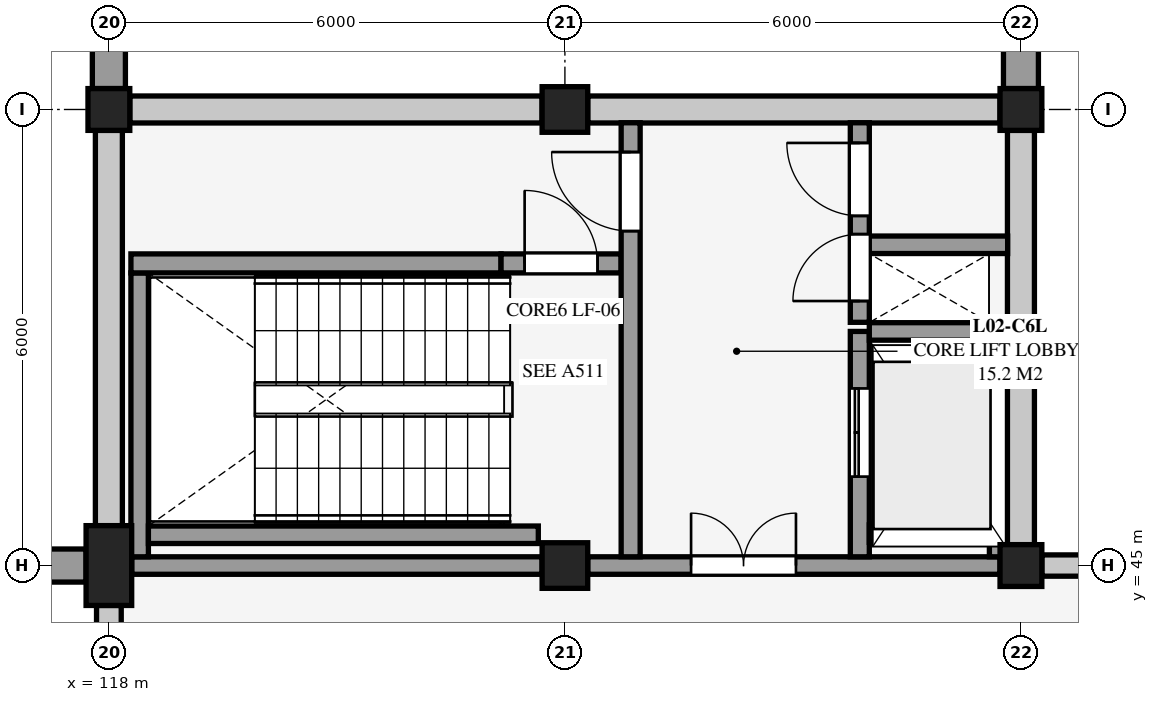
"""IFC4 building model, lengths in metres.
Left out: names, types, materials, properties, quantities, classifications, styles, units other than length and angle.
Written with IfcOpenShell. Run it as: python <this file> out.ifc"""

import sys

from ifc_helpers import new_model, si_unit, direction, frame, frame_2d, origin, origin_2d, place, context, subcontext, project, spatial, rectangle, extrude, element, fill, save


model = new_model("IFC4")
c1 = context("Model", 3, precision=1e-05, world=origin(), true_north=direction((0.0, 1.0)))
c2 = subcontext(c1, "Body", "Model", "MODEL_VIEW")
j1 = project(units=[si_unit("LENGTHUNIT", "METRE"), si_unit("PLANEANGLEUNIT", "RADIAN")], contexts=[c1])
p1 = place(None, origin())
s1 = spatial("IfcSite", under=j1, at=p1, CompositionType="ELEMENT")
p2 = place(p1, origin())
s2 = spatial("IfcBuilding", under=s1, at=p2, CompositionType="ELEMENT")
p3 = place(p2, frame((0.0, 0.0, 4.5)))
s3 = spatial("IfcBuildingStorey", under=s2, at=p3, CompositionType="ELEMENT", Elevation=4.5)
p4 = place(p3, frame((118.0, 45.0, 0.0), z_axis=(0.0, 0.0, 1.0), x_axis=(1.0, 0.0, 0.0)))
e1 = element("IfcColumn", 1, at=p4, inside=s3, PredefinedType="PILASTER", context=c2, shape_type="SweptSolid", body=[
    extrude(rectangle(XDim=0.6, YDim=1.05, at=origin_2d()), origin(), (0.0, 0.0, 1.0), 4.5),
])
p5 = place(p3, frame((118.0, 51.0, 0.0), z_axis=(0.0, 0.0, 1.0), x_axis=(1.0, 0.0, 0.0)))
e2 = element("IfcColumn", 2, at=p5, inside=s3, PredefinedType="COLUMN", context=c2, shape_type="SweptSolid", body=[
    extrude(rectangle(XDim=0.55, YDim=0.55, at=origin_2d()), origin(), (0.0, 0.0, 1.0), 4.5),
])
for number, where, z_axis, x_axis in (
    (3, (124.0, 45.0, 0.0), (0.0, 0.0, 1.0), (1.0, 0.0, 0.0)),
    (4, (124.0, 51.0, 0.0), (0.0, 0.0, 1.0), (1.0, 0.0, 0.0)),
):
    element("IfcColumn", number, at=place(p3, frame(where, z_axis=z_axis, x_axis=x_axis)), inside=s3, PredefinedType="COLUMN", context=c2, shape_type="SweptSolid", body=[
        extrude(rectangle(XDim=0.6, YDim=0.6, at=origin_2d()), origin(), (0.0, 0.0, 1.0), 4.5),
    ])
for number, where, z_axis, x_axis in (
    (5, (130.0, 45.0, 0.0), (0.0, 0.0, 1.0), (1.0, 0.0, 0.0)),
    (6, (130.0, 51.0, 0.0), (0.0, 0.0, 1.0), (1.0, 0.0, 0.0)),
):
    element("IfcColumn", number, at=place(p3, frame(where, z_axis=z_axis, x_axis=x_axis)), inside=s3, PredefinedType="COLUMN", context=c2, shape_type="SweptSolid", body=[
        extrude(rectangle(XDim=0.55, YDim=0.55, at=origin_2d()), origin(), (0.0, 0.0, 1.0), 4.5),
    ])
p6 = place(p3, frame((112.3, 45.0, 0.0), z_axis=(0.0, 0.0, 1.0), x_axis=(1.0, 0.0, 0.0)))
e7 = element("IfcWall", 7, at=p6, inside=s3, PredefinedType="USERDEFINED", context=c2, shape_type="SweptSolid", body=[
    extrude(rectangle(XDim=5.4, YDim=0.435, at=frame_2d((2.7, 0.0))), origin(), (0.0, 0.0, 1.0), 4.5),
])
p7 = place(p3, frame((118.0, 51.275, 0.0), z_axis=(0.0, 0.0, 1.0), x_axis=(0.0, 1.0, 0.0)))
e8 = element("IfcWall", 8, at=p7, inside=s3, PredefinedType="USERDEFINED", context=c2, shape_type="SweptSolid", body=[
    extrude(rectangle(XDim=4.7, YDim=0.435, at=frame_2d((2.35, 0.0))), origin(), (0.0, 0.0, 1.0), 4.5),
])
p8 = place(p3, frame((130.0, 51.275, 0.0), z_axis=(0.0, 0.0, 1.0), x_axis=(0.0, 1.0, 0.0)))
e9 = element("IfcWall", 9, at=p8, inside=s3, PredefinedType="USERDEFINED", context=c2, shape_type="SweptSolid", body=[
    extrude(rectangle(XDim=4.95, YDim=0.46, at=frame_2d((2.475, 0.0))), origin(), (0.0, 0.0, 1.0), 4.5),
])
p9 = place(p3, frame((130.275, 45.0, 0.0), z_axis=(0.0, 0.0, 1.0), x_axis=(1.0, 0.0, 0.0)))
e10 = element("IfcWall", 10, at=p9, inside=s3, PredefinedType="SOLIDWALL", context=c2, shape_type="SweptSolid", body=[
    extrude(rectangle(XDim=5.45, YDim=0.28, at=frame_2d((2.725, 0.0))), origin(), (0.0, 0.0, 1.0), 3.796),
])
p10 = place(p9, frame((1.85, 0.0, 0.75)))
e11 = element("IfcOpeningElement", 11, at=p10, cuts=e10, PredefinedType="OPENING", context=c2, shape_type="SweptSolid", body=[
    extrude(rectangle(XDim=1.75, YDim=2.3, at=frame_2d((0.875, 1.15))), frame((0.0, 0.15, 0.0), z_axis=(0.0, -1.0, 0.0), x_axis=(1.0, 0.0, 0.0)), (0.0, 0.0, 1.0), 0.3),
])
p11 = place(p3, frame((118.0, 39.3, 0.0), z_axis=(0.0, 0.0, 1.0), x_axis=(0.0, 1.0, 0.0)))
e12 = element("IfcWall", 12, at=p11, inside=s3, PredefinedType="SOLIDWALL", context=c2, shape_type="SweptSolid", body=[
    extrude(rectangle(XDim=5.175, YDim=0.325, at=frame_2d((2.587, 0.0))), origin(), (0.0, 0.0, 1.0), 3.778),
])
p12 = place(p11, frame((1.562, 0.0, 0.7)))
e13 = element("IfcOpeningElement", 13, at=p12, cuts=e12, PredefinedType="OPENING", context=c2, shape_type="SweptSolid", body=[
    extrude(rectangle(XDim=2.05, YDim=2.4, at=frame_2d((1.025, 1.2))), frame((0.0, 0.173, 0.0), z_axis=(0.0, -1.0, 0.0), x_axis=(1.0, 0.0, 0.0)), (0.0, 0.0, 1.0), 0.345),
])
p13 = place(p3, frame((118.275, 51.0, 0.0), z_axis=(0.0, 0.0, 1.0), x_axis=(1.0, 0.0, 0.0)))
e14 = element("IfcWall", 14, at=p13, inside=s3, PredefinedType="SOLIDWALL", context=c2, shape_type="SweptSolid", body=[
    extrude(rectangle(XDim=5.425, YDim=0.355, at=frame_2d((2.712, 0.0))), origin(), (0.0, 0.0, 1.0), 3.783),
])
p14 = place(p3, frame((124.3, 51.0, 0.0), z_axis=(0.0, 0.0, 1.0), x_axis=(1.0, 0.0, 0.0)))
e15 = element("IfcWall", 15, at=p14, inside=s3, PredefinedType="SOLIDWALL", context=c2, shape_type="SweptSolid", body=[
    extrude(rectangle(XDim=5.425, YDim=0.355, at=frame_2d((2.712, 0.0))), origin(), (0.0, 0.0, 1.0), 3.743),
])
p15 = place(p3, frame((118.0, 45.525, 0.0), z_axis=(0.0, 0.0, 1.0), x_axis=(0.0, 1.0, 0.0)))
e16 = element("IfcWall", 16, at=p15, inside=s3, PredefinedType="SOLIDWALL", context=c2, shape_type="SweptSolid", body=[
    extrude(rectangle(XDim=5.2, YDim=0.355, at=frame_2d((2.6, 0.0))), origin(), (0.0, 0.0, 1.0), 3.577),
])
p16 = place(p3, frame((130.0, 50.725, 0.0), z_axis=(0.0, 0.0, 1.0), x_axis=(0.0, -1.0, 0.0)))
e17 = element("IfcWall", 17, at=p16, inside=s3, PredefinedType="SOLIDWALL", context=c2, shape_type="SweptSolid", body=[
    extrude(rectangle(XDim=5.45, YDim=0.355, at=frame_2d((2.725, 0.0))), origin(), (0.0, 0.0, 1.0), 3.693),
])
p17 = place(p3, frame((118.3, 45.0, 0.0), z_axis=(0.0, 0.0, 1.0), x_axis=(1.0, 0.0, 0.0)))
e18 = element("IfcWall", 18, at=p17, inside=s3, PredefinedType="SHEAR", context=c2, shape_type="SweptSolid", body=[
    extrude(rectangle(XDim=5.4, YDim=0.23, at=frame_2d((2.7, 0.0))), origin(), (0.0, 0.0, 1.0), 4.276),
])
p18 = place(p3, frame((124.3, 45.0, 0.0), z_axis=(0.0, 0.0, 1.0), x_axis=(1.0, 0.0, 0.0)))
e19 = element("IfcWall", 19, at=p18, inside=s3, PredefinedType="SHEAR", context=c2, shape_type="SweptSolid", body=[
    extrude(rectangle(XDim=5.425, YDim=0.23, at=frame_2d((2.712, 0.0))), origin(), (0.0, 0.0, 1.0), 4.276),
])
p19 = place(p18, frame((1.36, 0.0, 0.0)))
e20 = element("IfcOpeningElement", 20, at=p19, cuts=e19, PredefinedType="OPENING", context=c2, shape_type="SweptSolid", body=[
    extrude(rectangle(XDim=1.38, YDim=2.16, at=frame_2d((0.69, 1.08))), frame((0.0, 0.125, 0.0), z_axis=(0.0, -1.0, 0.0), x_axis=(1.0, 0.0, 0.0)), (0.0, 0.0, 1.0), 0.25),
])
p20 = place(p3, frame((118.405, 45.115, 0.0), z_axis=(0.0, 0.0, 1.0), x_axis=(0.0, 1.0, 0.0)))
e21 = element("IfcWall", 21, at=p20, inside=s3, PredefinedType="SHEAR", context=c2, shape_type="SweptSolid", body=[
    extrude(rectangle(XDim=3.735, YDim=0.23, at=frame_2d((1.868, 0.0))), origin(), (0.0, 0.0, 1.0), 4.5),
])
p21 = place(p3, frame((118.52, 45.405, 0.0), z_axis=(0.0, 0.0, 1.0), x_axis=(1.0, 0.0, 0.0)))
e22 = element("IfcWall", 22, at=p21, inside=s3, PredefinedType="SHEAR", context=c2, shape_type="SweptSolid", body=[
    extrude(rectangle(XDim=5.13, YDim=0.23, at=frame_2d((2.565, 0.0))), origin(), (0.0, 0.0, 1.0), 4.5),
])
p22 = place(p3, frame((118.29, 48.975, 0.0), z_axis=(0.0, 0.0, 1.0), x_axis=(1.0, 0.0, 0.0)))
e23 = element("IfcWall", 23, at=p22, inside=s3, PredefinedType="SHEAR", context=c2, shape_type="SweptSolid", body=[
    extrude(rectangle(XDim=4.87, YDim=0.25, at=frame_2d((2.435, 0.0))), origin(), (0.0, 0.0, 1.0), 4.5),
])
p23 = place(p3, frame((123.16, 48.975, 0.0), z_axis=(0.0, 0.0, 1.0), x_axis=(1.0, 0.0, 0.0)))
e24 = element("IfcWall", 24, at=p23, inside=s3, PredefinedType="SHEAR", context=c2, shape_type="SweptSolid", body=[
    extrude(rectangle(XDim=1.58, YDim=0.25, at=frame_2d((0.79, 0.0))), origin(), (0.0, 0.0, 1.0), 4.276),
])
p24 = place(p23, frame((0.31, 0.0, 0.0)))
e25 = element("IfcOpeningElement", 25, at=p24, cuts=e24, PredefinedType="OPENING", context=c2, shape_type="SweptSolid", body=[
    extrude(rectangle(XDim=0.96, YDim=2.12, at=frame_2d((0.48, 1.06))), frame((0.0, 0.135, 0.0), z_axis=(0.0, -1.0, 0.0), x_axis=(1.0, 0.0, 0.0)), (0.0, 0.0, 1.0), 0.27),
])
p25 = place(p3, frame((124.865, 45.115, 0.0), z_axis=(0.0, 0.0, 1.0), x_axis=(0.0, 1.0, 0.0)))
e26 = element("IfcWall", 26, at=p25, inside=s3, PredefinedType="SHEAR", context=c2, shape_type="SweptSolid", body=[
    extrude(rectangle(XDim=5.71, YDim=0.25, at=frame_2d((2.855, 0.0))), origin(), (0.0, 0.0, 1.0), 4.276),
])
p26 = place(p25, frame((4.285, 0.0, 0.0)))
e27 = element("IfcOpeningElement", 27, at=p26, cuts=e26, PredefinedType="OPENING", context=c2, shape_type="SweptSolid", body=[
    extrude(rectangle(XDim=1.04, YDim=2.14, at=frame_2d((0.52, 1.07))), frame((0.0, 0.135, 0.0), z_axis=(0.0, -1.0, 0.0), x_axis=(1.0, 0.0, 0.0)), (0.0, 0.0, 1.0), 0.27),
])
p27 = place(p3, frame((127.88, 45.115, 0.0), z_axis=(0.0, 0.0, 1.0), x_axis=(0.0, 1.0, 0.0)))
e28 = element("IfcWall", 28, at=p27, inside=s3, PredefinedType="SHEAR", context=c2, shape_type="SweptSolid", body=[
    extrude(rectangle(XDim=2.965, YDim=0.25, at=frame_2d((1.482, 0.0))), origin(), (0.0, 0.0, 1.0), 4.5),
])
p28 = place(p27, frame((1.055, 0.0, 0.0)))
e29 = element("IfcOpeningElement", 29, at=p28, cuts=e28, PredefinedType="OPENING", context=c2, shape_type="SweptSolid", body=[
    extrude(rectangle(XDim=1.16, YDim=2.18, at=frame_2d((0.58, 1.09))), frame((0.0, 0.135, 0.0), z_axis=(0.0, -1.0, 0.0), x_axis=(1.0, 0.0, 0.0)), (0.0, 0.0, 1.0), 0.27),
])
p29 = place(p3, frame((128.005, 45.42, 0.0), z_axis=(0.0, 0.0, 1.0), x_axis=(1.0, 0.0, 0.0)))
e30 = element("IfcWall", 30, at=p29, inside=s3, PredefinedType="SHEAR", context=c2, shape_type="SweptSolid", body=[
    extrude(rectangle(XDim=1.58, YDim=0.23, at=frame_2d((0.79, 0.0))), origin(), (0.0, 0.0, 1.0), 4.5),
])
p30 = place(p3, frame((129.7, 45.115, 0.0), z_axis=(0.0, 0.0, 1.0), x_axis=(0.0, 1.0, 0.0)))
e31 = element("IfcWall", 31, at=p30, inside=s3, PredefinedType="SHEAR", context=c2, shape_type="SweptSolid", body=[
    extrude(rectangle(XDim=2.965, YDim=0.23, at=frame_2d((1.482, 0.0))), origin(), (0.0, 0.0, 1.0), 4.5),
])
p31 = place(p3, frame((128.005, 48.08, 0.0), z_axis=(0.0, 0.0, 1.0), x_axis=(1.0, 0.0, 0.0)))
e32 = element("IfcWall", 32, at=p31, inside=s3, PredefinedType="SHEAR", context=c2, shape_type="SweptSolid", body=[
    extrude(rectangle(XDim=1.58, YDim=0.23, at=frame_2d((0.79, 0.0))), origin(), (0.0, 0.0, 1.0), 4.5),
])
p32 = place(p3, frame((127.88, 48.2, 0.0), z_axis=(0.0, 0.0, 1.0), x_axis=(0.0, 1.0, 0.0)))
e33 = element("IfcWall", 33, at=p32, inside=s3, PredefinedType="SHEAR", context=c2, shape_type="SweptSolid", body=[
    extrude(rectangle(XDim=2.625, YDim=0.25, at=frame_2d((1.312, 0.0))), origin(), (0.0, 0.0, 1.0), 4.276),
])
p33 = place(p32, frame((0.28, 0.0, 0.0)))
e34 = element("IfcOpeningElement", 34, at=p33, cuts=e33, PredefinedType="OPENING", context=c2, shape_type="SweptSolid", body=[
    extrude(rectangle(XDim=0.88, YDim=2.08, at=frame_2d((0.44, 1.04))), frame((0.0, 0.135, 0.0), z_axis=(0.0, -1.0, 0.0), x_axis=(1.0, 0.0, 0.0)), (0.0, 0.0, 1.0), 0.27),
])
p34 = place(p32, frame((1.4, 0.0, 0.0)))
e35 = element("IfcOpeningElement", 35, at=p34, cuts=e33, PredefinedType="OPENING", context=c2, shape_type="SweptSolid", body=[
    extrude(rectangle(XDim=0.96, YDim=2.12, at=frame_2d((0.48, 1.06))), frame((0.0, 0.135, 0.0), z_axis=(0.0, -1.0, 0.0), x_axis=(1.0, 0.0, 0.0)), (0.0, 0.0, 1.0), 0.27),
])
p35 = place(p3, frame((128.005, 49.22, 0.0), z_axis=(0.0, 0.0, 1.0), x_axis=(1.0, 0.0, 0.0)))
e36 = element("IfcWall", 36, at=p35, inside=s3, PredefinedType="SHEAR", context=c2, shape_type="SweptSolid", body=[
    extrude(rectangle(XDim=1.82, YDim=0.23, at=frame_2d((0.91, 0.0))), origin(), (0.0, 0.0, 1.0), 4.276),
])
p36 = place(p19, origin())
e37 = element("IfcDoor", 37, at=p36, inside=s3, OperationType="DOUBLE_DOOR_SINGLE_SWING", PredefinedType="DOOR", context=c2, shape_type="SweptSolid", body=[
    extrude(rectangle(XDim=1.38, YDim=2.16, at=frame_2d((0.69, 1.08))), frame((0.0, 0.025, 0.0), z_axis=(0.0, -1.0, 0.0), x_axis=(1.0, 0.0, 0.0)), (0.0, 0.0, 1.0), 0.05),
])
fill(e20, e37)
p37 = place(p24, origin())
e38 = element("IfcDoor", 38, at=p37, inside=s3, OperationType="SINGLE_SWING_LEFT", PredefinedType="DOOR", context=c2, shape_type="SweptSolid", body=[
    extrude(rectangle(XDim=0.96, YDim=2.12, at=frame_2d((0.48, 1.06))), frame((0.0, 0.025, 0.0), z_axis=(0.0, -1.0, 0.0), x_axis=(1.0, 0.0, 0.0)), (0.0, 0.0, 1.0), 0.05),
])
fill(e25, e38)
p38 = place(p26, origin())
e39 = element("IfcDoor", 39, at=p38, inside=s3, OperationType="SINGLE_SWING_RIGHT", PredefinedType="DOOR", context=c2, shape_type="SweptSolid", body=[
    extrude(rectangle(XDim=1.04, YDim=2.14, at=frame_2d((0.52, 1.07))), frame((0.0, 0.025, 0.0), z_axis=(0.0, -1.0, 0.0), x_axis=(1.0, 0.0, 0.0)), (0.0, 0.0, 1.0), 0.05),
])
fill(e27, e39)
p39 = place(p28, origin())
e40 = element("IfcDoor", 40, at=p39, inside=s3, OperationType="DOUBLE_DOOR_SLIDING", PredefinedType="DOOR", context=c2, shape_type="SweptSolid", body=[
    extrude(rectangle(XDim=1.16, YDim=2.18, at=frame_2d((0.58, 1.09))), frame((0.0, 0.025, 0.0), z_axis=(0.0, -1.0, 0.0), x_axis=(1.0, 0.0, 0.0)), (0.0, 0.0, 1.0), 0.05),
])
fill(e29, e40)
p40 = place(p33, origin())
e41 = element("IfcDoor", 41, at=p40, inside=s3, OperationType="SINGLE_SWING_LEFT", PredefinedType="DOOR", context=c2, shape_type="SweptSolid", body=[
    extrude(rectangle(XDim=0.88, YDim=2.08, at=frame_2d((0.44, 1.04))), frame((0.0, 0.025, 0.0), z_axis=(0.0, -1.0, 0.0), x_axis=(1.0, 0.0, 0.0)), (0.0, 0.0, 1.0), 0.05),
])
fill(e34, e41)
p41 = place(p34, origin())
e42 = element("IfcDoor", 42, at=p41, inside=s3, OperationType="SINGLE_SWING_RIGHT", PredefinedType="DOOR", context=c2, shape_type="SweptSolid", body=[
    extrude(rectangle(XDim=0.96, YDim=2.12, at=frame_2d((0.48, 1.06))), frame((0.0, 0.025, 0.0), z_axis=(0.0, -1.0, 0.0), x_axis=(1.0, 0.0, 0.0)), (0.0, 0.0, 1.0), 0.05),
])
fill(e35, e42)
save(model, sys.argv[1])
